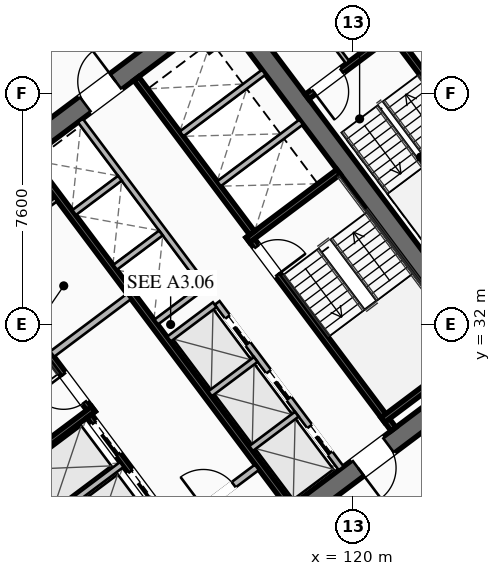
"""IFC4 building model, lengths in metres.
Left out: names, types, materials, properties, quantities, classifications, styles, units other than length and angle.
Written with IfcOpenShell. Run it as: python <this file> out.ifc"""

import sys

from ifc_helpers import new_model, si_unit, direction, frame, frame_2d, origin, place, context, subcontext, project, spatial, rectangle, extrude, element, fill, save


model = new_model("IFC4")
c1 = context("Model", 3, precision=1e-05, world=origin(), true_north=direction((0.0, 1.0)))
c2 = subcontext(c1, "Body", "Model", "MODEL_VIEW")
j1 = project(units=[si_unit("LENGTHUNIT", "METRE"), si_unit("PLANEANGLEUNIT", "RADIAN")], contexts=[c1])
p1 = place(None, origin())
s1 = spatial("IfcSite", under=j1, at=p1, CompositionType="ELEMENT")
p2 = place(p1, origin())
s2 = spatial("IfcBuilding", under=s1, at=p2, CompositionType="ELEMENT")
p3 = place(p2, frame((0.0, 0.0, 49.45)))
s3 = spatial("IfcBuildingStorey", under=s2, at=p3, CompositionType="ELEMENT", Elevation=49.45)
for number, where, z_axis, x_axis in (
    (1, (112.476, 21.107, 0.0), (0.0, 0.0, 1.0), (-0.6, 0.8, 0.0)),
    (2, (115.524, 42.893, 0.0), (0.0, 0.0, 1.0), (0.6, -0.8, 0.0)),
):
    element("IfcWall", number, at=place(p3, frame(where, z_axis=z_axis, x_axis=x_axis)), inside=s3, PredefinedType="SHEAR", context=c2, shape_type="SweptSolid", body=[
        extrude(rectangle(XDim=15.6, YDim=0.65, at=frame_2d((7.8, 0.0))), origin(), (0.0, 0.0, 1.0), 3.55),
    ])
p4 = place(p3, frame((124.429, 30.478, 0.0), z_axis=(0.0, 0.0, 1.0), x_axis=(-0.799998028465, -0.600002628705, 0.0)))
e3 = element("IfcWall", 3, at=p4, inside=s3, PredefinedType="SHEAR", context=c2, shape_type="SweptSolid", body=[
    extrude(rectangle(XDim=14.86, YDim=0.65, at=frame_2d((7.43, 0.0))), origin(), (0.0, 0.0, 1.0), 3.55),
])
p5 = place(p4, frame((9.13, 0.0, 0.0)))
e4 = element("IfcOpeningElement", 4, at=p5, cuts=e3, PredefinedType="OPENING", context=c2, shape_type="SweptSolid", body=[
    extrude(rectangle(XDim=1.25, YDim=2.25, at=frame_2d((0.625, 1.125))), frame((0.0, 0.335, 0.0), z_axis=(0.0, -1.0, 0.0), x_axis=(1.0, 0.0, 0.0)), (0.0, 0.0, 1.0), 0.67),
])
p6 = place(p4, frame((4.08, 0.0, 0.0)))
e5 = element("IfcOpeningElement", 5, at=p6, cuts=e3, PredefinedType="OPENING", context=c2, shape_type="SweptSolid", body=[
    extrude(rectangle(XDim=1.25, YDim=2.25, at=frame_2d((0.625, 1.125))), frame((0.0, 0.335, 0.0), z_axis=(0.0, -1.0, 0.0), x_axis=(1.0, 0.0, 0.0)), (0.0, 0.0, 1.0), 0.67),
])
p7 = place(p3, frame((103.571, 33.522, 0.0), z_axis=(0.0, 0.0, 1.0), x_axis=(0.799998028465, 0.600002628705, 0.0)))
e6 = element("IfcWall", 6, at=p7, inside=s3, PredefinedType="SHEAR", context=c2, shape_type="SweptSolid", body=[
    extrude(rectangle(XDim=14.86, YDim=0.65, at=frame_2d((7.43, 0.0))), origin(), (0.0, 0.0, 1.0), 3.55),
])
p8 = place(p7, frame((4.48, 0.0, 0.0)))
e7 = element("IfcOpeningElement", 7, at=p8, cuts=e6, PredefinedType="OPENING", context=c2, shape_type="SweptSolid", body=[
    extrude(rectangle(XDim=1.25, YDim=2.25, at=frame_2d((0.625, 1.125))), frame((0.0, 0.335, 0.0), z_axis=(0.0, -1.0, 0.0), x_axis=(1.0, 0.0, 0.0)), (0.0, 0.0, 1.0), 0.67),
])
p9 = place(p7, frame((9.53, 0.0, 0.0)))
e8 = element("IfcOpeningElement", 8, at=p9, cuts=e6, PredefinedType="OPENING", context=c2, shape_type="SweptSolid", body=[
    extrude(rectangle(XDim=1.25, YDim=2.25, at=frame_2d((0.625, 1.125))), frame((0.0, 0.335, 0.0), z_axis=(0.0, -1.0, 0.0), x_axis=(1.0, 0.0, 0.0)), (0.0, 0.0, 1.0), 0.67),
])
p10 = place(p3, frame((111.44, 29.08, 0.0), z_axis=(0.0, 0.0, 1.0), x_axis=(-0.600009827119, 0.799992629566, 0.0)))
e9 = element("IfcWall", 9, at=p10, inside=s3, PredefinedType="SHEAR", context=c2, shape_type="SweptSolid", body=[
    extrude(rectangle(XDim=7.95, YDim=0.2, at=frame_2d((3.975, 0.0))), origin(), (0.0, 0.0, 1.0), 3.35),
])
p11 = place(p10, frame((0.45, 0.0, 0.0)))
e10 = element("IfcOpeningElement", 10, at=p11, cuts=e9, PredefinedType="OPENING", context=c2, shape_type="SweptSolid", body=[
    extrude(rectangle(XDim=1.15, YDim=2.2, at=frame_2d((0.575, 1.1))), frame((0.0, 0.11, 0.0), z_axis=(0.0, -1.0, 0.0), x_axis=(1.0, 0.0, 0.0)), (0.0, 0.0, 1.0), 0.22),
])
p12 = place(p3, frame((108.476, 26.982, 0.0), z_axis=(0.0, 0.0, 1.0), x_axis=(0.799984290658, 0.600020945218, 0.0)))
e11 = element("IfcWall", 11, at=p12, inside=s3, PredefinedType="SHEAR", context=c2, shape_type="SweptSolid", body=[
    extrude(rectangle(XDim=3.73, YDim=0.2, at=frame_2d((1.865, 0.0))), origin(), (0.0, 0.0, 1.0), 3.35),
])
p13 = place(p3, frame((116.56, 34.92, 0.0), z_axis=(0.0, 0.0, 1.0), x_axis=(0.600009827119, -0.799992629566, 0.0)))
e12 = element("IfcWall", 12, at=p13, inside=s3, PredefinedType="SHEAR", context=c2, shape_type="SweptSolid", body=[
    extrude(rectangle(XDim=7.95, YDim=0.2, at=frame_2d((3.975, 0.0))), origin(), (0.0, 0.0, 1.0), 3.35),
])
p14 = place(p13, frame((0.45, 0.0, 0.0)))
e13 = element("IfcOpeningElement", 13, at=p14, cuts=e12, PredefinedType="OPENING", context=c2, shape_type="SweptSolid", body=[
    extrude(rectangle(XDim=1.15, YDim=2.2, at=frame_2d((0.575, 1.1))), frame((0.0, 0.11, 0.0), z_axis=(0.0, -1.0, 0.0), x_axis=(1.0, 0.0, 0.0)), (0.0, 0.0, 1.0), 0.22),
])
for number, where, z_axis, x_axis in (
    (14, (116.54, 34.78, 0.0), (0.0, 0.0, 1.0), (0.8, 0.6, 0.0)),
    (15, (120.98, 28.86, 0.0), (0.0, 0.0, 1.0), (0.8, 0.6, 0.0)),
):
    element("IfcWall", number, at=place(p3, frame(where, z_axis=z_axis, x_axis=x_axis)), inside=s3, PredefinedType="SHEAR", context=c2, shape_type="SweptSolid", body=[
        extrude(rectangle(XDim=3.73, YDim=0.2, at=frame_2d((1.865, 0.0))), origin(), (0.0, 0.0, 1.0), 3.35),
    ])
p15 = place(p3, frame((117.938, 26.016, 0.0), z_axis=(0.0, 0.0, 1.0), x_axis=(-0.600005463273, 0.799995902516, 0.0)))
e16 = element("IfcWall", 16, at=p15, inside=s3, PredefinedType="SHEAR", context=c2, shape_type="SweptSolid", body=[
    extrude(rectangle(XDim=14.3, YDim=0.2, at=frame_2d((7.15, 0.0))), origin(), (0.0, 0.0, 1.0), 3.35),
])
p16 = place(p3, frame((110.104, 31.028, 0.0), z_axis=(0.0, 0.0, 1.0), x_axis=(0.800018601094, 0.59997519774, 0.0)))
e17 = element("IfcWall", 17, at=p16, inside=s3, PredefinedType="SOLIDWALL", context=c2, shape_type="SweptSolid", body=[
    extrude(rectangle(XDim=3.15, YDim=0.22, at=frame_2d((1.575, 0.0))), origin(), (0.0, 0.0, 1.0), 2.703),
])
p17 = place(p3, frame((114.316, 25.412, 0.0), z_axis=(0.0, 0.0, 1.0), x_axis=(0.800018601094, 0.59997519774, 0.0)))
e18 = element("IfcWall", 18, at=p17, inside=s3, PredefinedType="SOLIDWALL", context=c2, shape_type="SweptSolid", body=[
    extrude(rectangle(XDim=3.15, YDim=0.22, at=frame_2d((1.575, 0.0))), origin(), (0.0, 0.0, 1.0), 2.703),
])
p18 = place(p17, frame((0.95, 0.0, 0.0)))
e19 = element("IfcOpeningElement", 19, at=p18, cuts=e18, PredefinedType="OPENING", context=c2, shape_type="SweptSolid", body=[
    extrude(rectangle(XDim=1.25, YDim=2.25, at=frame_2d((0.625, 1.125))), frame((0.0, 0.12, 0.0), z_axis=(0.0, -1.0, 0.0), x_axis=(1.0, 0.0, 0.0)), (0.0, 0.0, 1.0), 0.24),
])
p19 = place(p3, frame((115.13, 23.91, 0.0), z_axis=(0.0, 0.0, 1.0), x_axis=(-0.599975393228, 0.800018454488, 0.0)))
e20 = element("IfcWall", 20, at=p19, inside=s3, PredefinedType="SHEAR", context=c2, shape_type="SweptSolid", body=[
    extrude(rectangle(XDim=6.35, YDim=0.2, at=frame_2d((3.175, 0.0))), origin(), (0.0, 0.0, 1.0), 3.35),
])
p20 = place(p19, frame((4.775, 0.0, 0.0)))
e21 = element("IfcOpeningElement", 21, at=p20, cuts=e20, PredefinedType="OPENING", context=c2, shape_type="SweptSolid", body=[
    extrude(rectangle(XDim=1.3, YDim=2.25, at=frame_2d((0.65, 1.125))), frame((0.0, 0.11, 0.0), z_axis=(0.0, -1.0, 0.0), x_axis=(1.0, 0.0, 0.0)), (0.0, 0.0, 1.0), 0.22),
])
p21 = place(p19, frame((2.775, 0.0, 0.0)))
e22 = element("IfcOpeningElement", 22, at=p21, cuts=e20, PredefinedType="OPENING", context=c2, shape_type="SweptSolid", body=[
    extrude(rectangle(XDim=1.3, YDim=2.25, at=frame_2d((0.65, 1.125))), frame((0.0, 0.11, 0.0), z_axis=(0.0, -1.0, 0.0), x_axis=(1.0, 0.0, 0.0)), (0.0, 0.0, 1.0), 0.22),
])
p22 = place(p19, frame((0.575, 0.0, 0.0)))
e23 = element("IfcOpeningElement", 23, at=p22, cuts=e20, PredefinedType="OPENING", context=c2, shape_type="SweptSolid", body=[
    extrude(rectangle(XDim=1.3, YDim=2.25, at=frame_2d((0.65, 1.125))), frame((0.0, 0.11, 0.0), z_axis=(0.0, -1.0, 0.0), x_axis=(1.0, 0.0, 0.0)), (0.0, 0.0, 1.0), 0.22),
])
p23 = place(p3, frame((109.688, 25.366, 0.0), z_axis=(0.0, 0.0, 1.0), x_axis=(0.8, 0.6, 0.0)))
e24 = element("IfcWall", 24, at=p23, inside=s3, PredefinedType="SOLIDWALL", context=c2, shape_type="SweptSolid", body=[
    extrude(rectangle(XDim=3.38, YDim=0.2, at=frame_2d((1.69, 0.0))), origin(), (0.0, 0.0, 1.0), 3.35),
])
p24 = place(p3, frame((112.87, 40.09, 0.0), z_axis=(0.0, 0.0, 1.0), x_axis=(0.599975393228, -0.800018454488, 0.0)))
e25 = element("IfcWall", 25, at=p24, inside=s3, PredefinedType="SHEAR", context=c2, shape_type="SweptSolid", body=[
    extrude(rectangle(XDim=6.35, YDim=0.2, at=frame_2d((3.175, 0.0))), origin(), (0.0, 0.0, 1.0), 3.35),
])
for number, where, z_axis, x_axis in (
    (26, (115.59, 36.63, 0.0), (0.0, 0.0, 1.0), (0.8, 0.6, 0.0)),
    (27, (114.36, 38.27, 0.0), (0.0, 0.0, 1.0), (0.8, 0.6, 0.0)),
):
    element("IfcWall", number, at=place(p3, frame(where, z_axis=z_axis, x_axis=x_axis)), inside=s3, PredefinedType="SOLIDWALL", context=c2, shape_type="SweptSolid", body=[
        extrude(rectangle(XDim=3.38, YDim=0.2, at=frame_2d((1.69, 0.0))), origin(), (0.0, 0.0, 1.0), 3.35),
    ])
p25 = place(p3, frame((107.71, 34.22, 0.0), z_axis=(0.0, 0.0, 1.0), x_axis=(0.799981399002, 0.60002480053, 0.0)))
e28 = element("IfcWall", 28, at=p25, inside=s3, PredefinedType="PARTITIONING", context=c2, shape_type="SweptSolid", body=[
    extrude(rectangle(XDim=3.15, YDim=0.135, at=frame_2d((1.575, 0.0))), origin(), (0.0, 0.0, 1.0), 2.703),
])
p26 = place(p25, frame((1.05, 0.0, 0.0)))
e29 = element("IfcOpeningElement", 29, at=p26, cuts=e28, PredefinedType="OPENING", context=c2, shape_type="SweptSolid", body=[
    extrude(rectangle(XDim=1.05, YDim=2.2, at=frame_2d((0.525, 1.1))), frame((0.0, 0.077, 0.0), z_axis=(0.0, -1.0, 0.0), x_axis=(1.0, 0.0, 0.0)), (0.0, 0.0, 1.0), 0.155),
])
p27 = place(p3, frame((119.61, 27.27, 0.0), z_axis=(0.0, 0.0, 1.0), x_axis=(-0.600011488909, 0.79999138319, 0.0)))
e30 = element("IfcWall", 30, at=p27, inside=s3, PredefinedType="SOLIDWALL", context=c2, shape_type="SweptSolid", body=[
    extrude(rectangle(XDim=6.8, YDim=0.2, at=frame_2d((3.4, 0.0))), origin(), (0.0, 0.0, 1.0), 3.35),
])
p28 = place(p27, frame((0.625, 0.0, 0.0)))
e31 = element("IfcOpeningElement", 31, at=p28, cuts=e30, PredefinedType="OPENING", context=c2, shape_type="SweptSolid", body=[
    extrude(rectangle(XDim=1.1, YDim=2.2, at=frame_2d((0.55, 1.1))), frame((0.0, 0.11, 0.0), z_axis=(0.0, -1.0, 0.0), x_axis=(1.0, 0.0, 0.0)), (0.0, 0.0, 1.0), 0.22),
])
p29 = place(p27, frame((2.875, 0.0, 0.0)))
e32 = element("IfcOpeningElement", 32, at=p29, cuts=e30, PredefinedType="OPENING", context=c2, shape_type="SweptSolid", body=[
    extrude(rectangle(XDim=1.1, YDim=2.2, at=frame_2d((0.55, 1.1))), frame((0.0, 0.11, 0.0), z_axis=(0.0, -1.0, 0.0), x_axis=(1.0, 0.0, 0.0)), (0.0, 0.0, 1.0), 0.22),
])
p30 = place(p27, frame((5.125, 0.0, 0.0)))
e33 = element("IfcOpeningElement", 33, at=p30, cuts=e30, PredefinedType="OPENING", context=c2, shape_type="SweptSolid", body=[
    extrude(rectangle(XDim=1.1, YDim=2.2, at=frame_2d((0.55, 1.1))), frame((0.0, 0.11, 0.0), z_axis=(0.0, -1.0, 0.0), x_axis=(1.0, 0.0, 0.0)), (0.0, 0.0, 1.0), 0.22),
])
p31 = place(p3, frame((116.646, 27.922, 0.0), z_axis=(0.0, 0.0, 1.0), x_axis=(0.8, 0.6, 0.0)))
e34 = element("IfcWall", 34, at=p31, inside=s3, PredefinedType="SOLIDWALL", context=c2, shape_type="SweptSolid", body=[
    extrude(rectangle(XDim=1.88, YDim=0.2, at=frame_2d((0.94, 0.0))), origin(), (0.0, 0.0, 1.0), 3.35),
])
p32 = place(p3, frame((115.296, 29.722, 0.0), z_axis=(0.0, 0.0, 1.0), x_axis=(0.799984418148, 0.600020775241, 0.0)))
e35 = element("IfcWall", 35, at=p32, inside=s3, PredefinedType="SOLIDWALL", context=c2, shape_type="SweptSolid", body=[
    extrude(rectangle(XDim=1.88, YDim=0.2, at=frame_2d((0.94, 0.0))), origin(), (0.0, 0.0, 1.0), 3.35),
])
p33 = place(p3, frame((113.946, 31.522, 0.0), z_axis=(0.0, 0.0, 1.0), x_axis=(0.8, 0.6, 0.0)))
e36 = element("IfcWall", 36, at=p33, inside=s3, PredefinedType="SOLIDWALL", context=c2, shape_type="SweptSolid", body=[
    extrude(rectangle(XDim=1.88, YDim=0.2, at=frame_2d((0.94, 0.0))), origin(), (0.0, 0.0, 1.0), 3.35),
])
p34 = place(p3, frame((115.11, 33.27, 0.0), z_axis=(0.0, 0.0, 1.0), x_axis=(-0.600011488909, 0.79999138319, 0.0)))
e37 = element("IfcWall", 37, at=p34, inside=s3, PredefinedType="SOLIDWALL", context=c2, shape_type="SweptSolid", body=[
    extrude(rectangle(XDim=6.8, YDim=0.2, at=frame_2d((3.4, 0.0))), origin(), (0.0, 0.0, 1.0), 3.35),
])
p35 = place(p3, frame((113.526, 32.082, 0.0), z_axis=(0.0, 0.0, 1.0), x_axis=(0.800046745961, 0.599937666993, 0.0)))
e38 = element("IfcWall", 38, at=p35, inside=s3, PredefinedType="SOLIDWALL", context=c2, shape_type="SweptSolid", body=[
    extrude(rectangle(XDim=1.88, YDim=0.2, at=frame_2d((0.94, 0.0))), origin(), (0.0, 0.0, 1.0), 3.35),
])
p36 = place(p3, frame((112.176, 33.882, 0.0), z_axis=(0.0, 0.0, 1.0), x_axis=(0.8, 0.6, 0.0)))
e39 = element("IfcWall", 39, at=p36, inside=s3, PredefinedType="SOLIDWALL", context=c2, shape_type="SweptSolid", body=[
    extrude(rectangle(XDim=1.88, YDim=0.2, at=frame_2d((0.94, 0.0))), origin(), (0.0, 0.0, 1.0), 3.35),
])
p37 = place(p3, frame((110.826, 35.682, 0.0), z_axis=(0.0, 0.0, 1.0), x_axis=(0.799984418148, 0.600020775241, 0.0)))
e40 = element("IfcWall", 40, at=p37, inside=s3, PredefinedType="SOLIDWALL", context=c2, shape_type="SweptSolid", body=[
    extrude(rectangle(XDim=1.88, YDim=0.2, at=frame_2d((0.94, 0.0))), origin(), (0.0, 0.0, 1.0), 3.35),
])
p38 = place(p3, frame((125.304, 36.228, 0.0), z_axis=(0.0, 0.0, 1.0), x_axis=(-0.59998851072, 0.800008616831, 0.0)))
e41 = element("IfcWall", 41, at=p38, inside=s3, PredefinedType="SHEAR", context=c2, shape_type="SweptSolid", body=[
    extrude(rectangle(XDim=6.8, YDim=0.2, at=frame_2d((3.4, 0.0))), origin(), (0.0, 0.0, 1.0), 3.35),
])
p39 = place(p3, frame((121.204, 41.528, 0.0), z_axis=(0.0, 0.0, 1.0), x_axis=(-0.800017232136, -0.599977023131, 0.0)))
e42 = element("IfcWall", 42, at=p39, inside=s3, PredefinedType="SHEAR", context=c2, shape_type="SweptSolid", body=[
    extrude(rectangle(XDim=3.4, YDim=0.2, at=frame_2d((1.7, 0.0))), origin(), (0.0, 0.0, 1.0), 3.35),
])
p40 = place(p39, frame((1.975, 0.0, 0.0)))
e43 = element("IfcOpeningElement", 43, at=p40, cuts=e42, PredefinedType="OPENING", context=c2, shape_type="SweptSolid", body=[
    extrude(rectangle(XDim=1.15, YDim=2.2, at=frame_2d((0.575, 1.1))), frame((0.0, 0.11, 0.0), z_axis=(0.0, -1.0, 0.0), x_axis=(1.0, 0.0, 0.0)), (0.0, 0.0, 1.0), 0.22),
])
p41 = place(p3, frame((119.824, 40.618, 0.0), z_axis=(0.0, 0.0, 1.0), x_axis=(-0.599982243973, 0.800013316712, 0.0)))
e44 = element("IfcWall", 44, at=p41, inside=s3, PredefinedType="PARTITIONING", context=c2, shape_type="SweptSolid", body=[
    extrude(rectangle(XDim=4.4, YDim=0.135, at=frame_2d((2.2, 0.0))), origin(), (0.0, 0.0, 1.0), 2.703),
])
p42 = place(p3, frame((98.516, 34.012, 0.0), z_axis=(0.0, 0.0, 1.0), x_axis=(0.799998035726, 0.600002619023, 0.0)))
e45 = element("IfcWall", 45, at=p42, inside=s3, PredefinedType="PARTITIONING", context=c2, shape_type="SweptSolid", body=[
    extrude(rectangle(XDim=29.83, YDim=0.135, at=frame_2d((14.915, 0.0))), origin(), (0.0, 0.0, 1.0), 2.703),
])
p43 = place(p42, frame((0.3, 0.0, 0.0)))
e46 = element("IfcOpeningElement", 46, at=p43, cuts=e45, PredefinedType="OPENING", context=c2, shape_type="SweptSolid", body=[
    extrude(rectangle(XDim=0.95, YDim=2.05, at=frame_2d((0.475, 1.025))), frame((0.0, 0.077, 0.0), z_axis=(0.0, -1.0, 0.0), x_axis=(1.0, 0.0, 0.0)), (0.0, 0.0, 1.0), 0.155),
])
p44 = place(p42, frame((28.58, 0.0, 0.0)))
e47 = element("IfcOpeningElement", 47, at=p44, cuts=e45, PredefinedType="OPENING", context=c2, shape_type="SweptSolid", body=[
    extrude(rectangle(XDim=0.95, YDim=2.05, at=frame_2d((0.475, 1.025))), frame((0.0, 0.077, 0.0), z_axis=(0.0, -1.0, 0.0), x_axis=(1.0, 0.0, 0.0)), (0.0, 0.0, 1.0), 0.155),
])
p45 = place(p3, frame((135.46, 34.47, 0.0), z_axis=(0.0, 0.0, 1.0), x_axis=(-0.800000982127, -0.599998690494, 0.0)))
e48 = element("IfcWall", 48, at=p45, inside=s3, PredefinedType="PARTITIONING", context=c2, shape_type="SweptSolid", body=[
    extrude(rectangle(XDim=29.83, YDim=0.135, at=frame_2d((14.915, 0.0))), origin(), (0.0, 0.0, 1.0), 2.703),
])
p46 = place(p45, frame((28.5, 0.0, 0.0)))
e49 = element("IfcOpeningElement", 49, at=p46, cuts=e48, PredefinedType="OPENING", context=c2, shape_type="SweptSolid", body=[
    extrude(rectangle(XDim=0.95, YDim=2.05, at=frame_2d((0.475, 1.025))), frame((0.0, 0.077, 0.0), z_axis=(0.0, -1.0, 0.0), x_axis=(1.0, 0.0, 0.0)), (0.0, 0.0, 1.0), 0.155),
])
p47 = place(p45, frame((0.38, 0.0, 0.0)))
e50 = element("IfcOpeningElement", 50, at=p47, cuts=e48, PredefinedType="OPENING", context=c2, shape_type="SweptSolid", body=[
    extrude(rectangle(XDim=0.95, YDim=2.05, at=frame_2d((0.475, 1.025))), frame((0.0, 0.077, 0.0), z_axis=(0.0, -1.0, 0.0), x_axis=(1.0, 0.0, 0.0)), (0.0, 0.0, 1.0), 0.155),
])
p48 = place(p3, frame((111.548, 16.636, 0.0), z_axis=(0.0, 0.0, 1.0), x_axis=(-0.600003610192, 0.799997292343, 0.0)))
e51 = element("IfcWall", 51, at=p48, inside=s3, PredefinedType="PARTITIONING", context=c2, shape_type="SweptSolid", body=[
    extrude(rectangle(XDim=21.64, YDim=0.135, at=frame_2d((10.82, 0.0))), origin(), (0.0, 0.0, 1.0), 2.703),
])
p49 = place(p48, frame((0.3, 0.0, 0.0)))
e52 = element("IfcOpeningElement", 52, at=p49, cuts=e51, PredefinedType="OPENING", context=c2, shape_type="SweptSolid", body=[
    extrude(rectangle(XDim=0.95, YDim=2.05, at=frame_2d((0.475, 1.025))), frame((0.0, 0.077, 0.0), z_axis=(0.0, -1.0, 0.0), x_axis=(1.0, 0.0, 0.0)), (0.0, 0.0, 1.0), 0.155),
])
p50 = place(p48, frame((20.39, 0.0, 0.0)))
e53 = element("IfcOpeningElement", 53, at=p50, cuts=e51, PredefinedType="OPENING", context=c2, shape_type="SweptSolid", body=[
    extrude(rectangle(XDim=0.95, YDim=2.05, at=frame_2d((0.475, 1.025))), frame((0.0, 0.077, 0.0), z_axis=(0.0, -1.0, 0.0), x_axis=(1.0, 0.0, 0.0)), (0.0, 0.0, 1.0), 0.155),
])
p51 = place(p9, origin())
e54 = element("IfcDoor", 54, at=p51, inside=s3, OperationType="SINGLE_SWING_RIGHT", PredefinedType="DOOR", context=c2, shape_type="SweptSolid", body=[
    extrude(rectangle(XDim=1.25, YDim=2.25, at=frame_2d((0.625, 1.125))), frame((0.0, 0.025, 0.0), z_axis=(0.0, -1.0, 0.0), x_axis=(1.0, 0.0, 0.0)), (0.0, 0.0, 1.0), 0.05),
])
fill(e8, e54)
p52 = place(p6, origin())
e55 = element("IfcDoor", 55, at=p52, inside=s3, OperationType="SINGLE_SWING_RIGHT", PredefinedType="DOOR", context=c2, shape_type="SweptSolid", body=[
    extrude(rectangle(XDim=1.25, YDim=2.25, at=frame_2d((0.625, 1.125))), frame((0.0, 0.025, 0.0), z_axis=(0.0, -1.0, 0.0), x_axis=(1.0, 0.0, 0.0)), (0.0, 0.0, 1.0), 0.05),
])
fill(e5, e55)
p53 = place(p11, origin())
e56 = element("IfcDoor", 56, at=p53, inside=s3, OperationType="SINGLE_SWING_RIGHT", PredefinedType="DOOR", context=c2, shape_type="SweptSolid", body=[
    extrude(rectangle(XDim=1.15, YDim=2.2, at=frame_2d((0.575, 1.1))), frame((0.0, 0.025, 0.0), z_axis=(0.0, -1.0, 0.0), x_axis=(1.0, 0.0, 0.0)), (0.0, 0.0, 1.0), 0.05),
])
fill(e10, e56)
p54 = place(p14, origin())
e57 = element("IfcDoor", 57, at=p54, inside=s3, OperationType="SINGLE_SWING_RIGHT", PredefinedType="DOOR", context=c2, shape_type="SweptSolid", body=[
    extrude(rectangle(XDim=1.15, YDim=2.2, at=frame_2d((0.575, 1.1))), frame((0.0, 0.025, 0.0), z_axis=(0.0, -1.0, 0.0), x_axis=(1.0, 0.0, 0.0)), (0.0, 0.0, 1.0), 0.05),
])
fill(e13, e57)
p55 = place(p18, origin())
e58 = element("IfcDoor", 58, at=p55, inside=s3, OperationType="SINGLE_SWING_LEFT", PredefinedType="DOOR", context=c2, shape_type="SweptSolid", body=[
    extrude(rectangle(XDim=1.25, YDim=2.25, at=frame_2d((0.625, 1.125))), frame((0.0, 0.025, 0.0), z_axis=(0.0, -1.0, 0.0), x_axis=(1.0, 0.0, 0.0)), (0.0, 0.0, 1.0), 0.05),
])
fill(e19, e58)
p56 = place(p40, origin())
e59 = element("IfcDoor", 59, at=p56, inside=s3, OperationType="SINGLE_SWING_RIGHT", PredefinedType="DOOR", context=c2, shape_type="SweptSolid", body=[
    extrude(rectangle(XDim=1.15, YDim=2.2, at=frame_2d((0.575, 1.1))), frame((0.0, 0.025, 0.0), z_axis=(0.0, -1.0, 0.0), x_axis=(1.0, 0.0, 0.0)), (0.0, 0.0, 1.0), 0.05),
])
fill(e43, e59)
p57 = place(p20, origin())
e60 = element("IfcDoor", 60, at=p57, inside=s3, OperationType="SLIDING_TO_LEFT", PredefinedType="DOOR", context=c2, shape_type="SweptSolid", body=[
    extrude(rectangle(XDim=1.3, YDim=2.25, at=frame_2d((0.65, 1.125))), frame((0.0, 0.025, 0.0), z_axis=(0.0, -1.0, 0.0), x_axis=(1.0, 0.0, 0.0)), (0.0, 0.0, 1.0), 0.05),
])
fill(e21, e60)
p58 = place(p21, origin())
e61 = element("IfcDoor", 61, at=p58, inside=s3, OperationType="SLIDING_TO_LEFT", PredefinedType="DOOR", context=c2, shape_type="SweptSolid", body=[
    extrude(rectangle(XDim=1.3, YDim=2.25, at=frame_2d((0.65, 1.125))), frame((0.0, 0.025, 0.0), z_axis=(0.0, -1.0, 0.0), x_axis=(1.0, 0.0, 0.0)), (0.0, 0.0, 1.0), 0.05),
])
fill(e22, e61)
p59 = place(p28, origin())
e62 = element("IfcDoor", 62, at=p59, inside=s3, OperationType="SLIDING_TO_LEFT", PredefinedType="DOOR", context=c2, shape_type="SweptSolid", body=[
    extrude(rectangle(XDim=1.1, YDim=2.2, at=frame_2d((0.55, 1.1))), frame((0.0, 0.025, 0.0), z_axis=(0.0, -1.0, 0.0), x_axis=(1.0, 0.0, 0.0)), (0.0, 0.0, 1.0), 0.05),
])
fill(e31, e62)
p60 = place(p29, origin())
e63 = element("IfcDoor", 63, at=p60, inside=s3, OperationType="SLIDING_TO_LEFT", PredefinedType="DOOR", context=c2, shape_type="SweptSolid", body=[
    extrude(rectangle(XDim=1.1, YDim=2.2, at=frame_2d((0.55, 1.1))), frame((0.0, 0.025, 0.0), z_axis=(0.0, -1.0, 0.0), x_axis=(1.0, 0.0, 0.0)), (0.0, 0.0, 1.0), 0.05),
])
fill(e32, e63)
p61 = place(p30, origin())
e64 = element("IfcDoor", 64, at=p61, inside=s3, OperationType="SLIDING_TO_LEFT", PredefinedType="DOOR", context=c2, shape_type="SweptSolid", body=[
    extrude(rectangle(XDim=1.1, YDim=2.2, at=frame_2d((0.55, 1.1))), frame((0.0, 0.025, 0.0), z_axis=(0.0, -1.0, 0.0), x_axis=(1.0, 0.0, 0.0)), (0.0, 0.0, 1.0), 0.05),
])
fill(e33, e64)
save(model, sys.argv[1])
